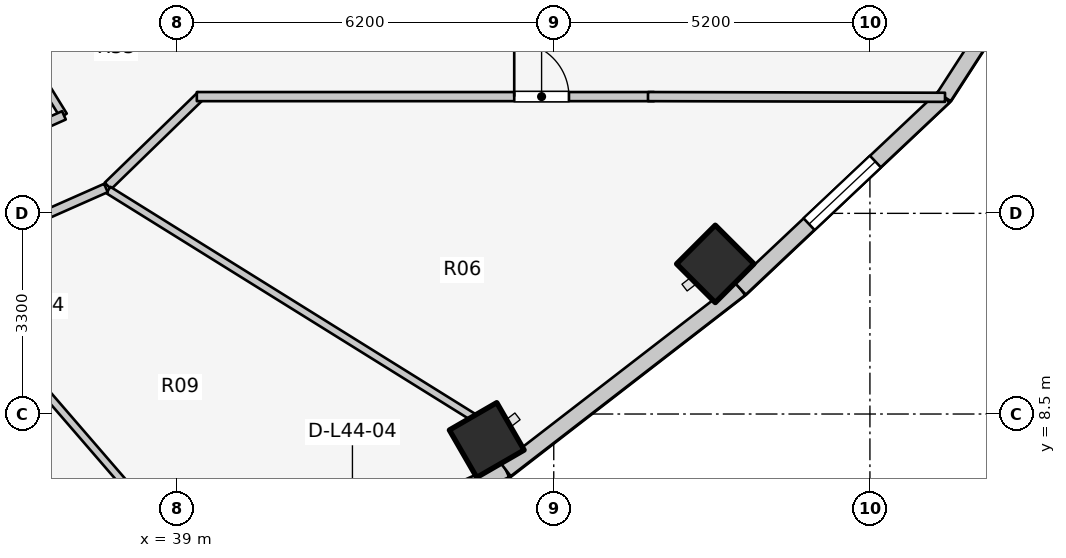
"""IFC4 building model, lengths in metres.
Left out: names, types, materials, properties, quantities, classifications, styles, units other than length and angle.
Written with IfcOpenShell. Run it as: python <this file> out.ifc"""

import sys

from ifc_helpers import new_model, si_unit, direction, frame, frame_2d, origin, origin_2d, place, context, subcontext, project, spatial, rectangle, extrude, element, fill, save


model = new_model("IFC4")
c1 = context("Model", 3, precision=1e-05, world=origin(), true_north=direction((0.0, 1.0)))
c2 = subcontext(c1, "Body", "Model", "MODEL_VIEW")
j1 = project(units=[si_unit("LENGTHUNIT", "METRE"), si_unit("PLANEANGLEUNIT", "RADIAN")], contexts=[c1])
p1 = place(None, origin())
s1 = spatial("IfcSite", under=j1, at=p1, CompositionType="ELEMENT")
p2 = place(p1, origin())
s2 = spatial("IfcBuilding", under=s1, at=p2, CompositionType="ELEMENT")
p3 = place(p2, frame((0.0, 0.0, 146.7)))
s3 = spatial("IfcBuildingStorey", under=s2, at=p3, CompositionType="ELEMENT", Elevation=146.7)
for number, where, z_axis, x_axis in (
    (1, (44.098, 8.072, 0.0), (0.0, 0.0, 1.0), (0.5, -0.866, 0.0)),
    (2, (47.857, 10.969, 0.0), (0.0, 0.0, 1.0), (0.707, -0.707, 0.0)),
):
    element("IfcColumn", number, at=place(p3, frame(where, z_axis=z_axis, x_axis=x_axis)), inside=s3, PredefinedType="COLUMN", context=c2, shape_type="SweptSolid", body=[
        extrude(rectangle(XDim=0.9, YDim=0.9, at=origin_2d()), origin(), (0.0, 0.0, 1.0), 3.1),
    ])
p4 = place(p3, frame((39.365, 5.315, 0.0), z_axis=(0.0, 0.0, 1.0), x_axis=(0.912353637112, 0.409403029847, 0.0)))
e3 = element("IfcWall", 3, at=p4, inside=s3, PredefinedType="STANDARD", context=c2, shape_type="SweptSolid", body=[
    extrude(rectangle(XDim=5.533, YDim=0.26, at=frame_2d((2.766, 0.0))), origin(), (0.0, 0.0, 1.0), 2.88),
])
p5 = place(p4, frame((2.167, 0.0, 0.0)))
e4 = element("IfcOpeningElement", 4, at=p5, cuts=e3, PredefinedType="OPENING", context=c2, shape_type="SweptSolid", body=[
    extrude(rectangle(XDim=1.2, YDim=2.2, at=frame_2d((0.6, 1.1))), frame((0.0, 0.14, 0.0), z_axis=(0.0, -1.0, 0.0), x_axis=(1.0, 0.0, 0.0)), (0.0, 0.0, 1.0), 0.28),
])
p6 = place(p3, frame((44.413, 7.581, 0.0), z_axis=(0.0, 0.0, 1.0), x_axis=(0.791460185804, 0.611220724687, 0.0)))
e5 = element("IfcWall", 5, at=p6, inside=s3, PredefinedType="STANDARD", context=c2, shape_type="SweptSolid", body=[
    extrude(rectangle(XDim=4.872, YDim=0.26, at=frame_2d((2.436, 0.0))), origin(), (0.0, 0.0, 1.0), 2.85),
])
p7 = place(p3, frame((48.269, 10.559, 0.0), z_axis=(0.0, 0.0, 1.0), x_axis=(0.727667301037, 0.68593024354, 0.0)))
e6 = element("IfcWall", 6, at=p7, inside=s3, PredefinedType="STANDARD", context=c2, shape_type="SweptSolid", body=[
    extrude(rectangle(XDim=4.604, YDim=0.26, at=frame_2d((2.302, 0.0))), origin(), (0.0, 0.0, 1.0), 2.85),
])
p8 = place(p7, frame((1.552, 0.0, 0.75)))
e7 = element("IfcOpeningElement", 7, at=p8, cuts=e6, PredefinedType="OPENING", context=c2, shape_type="SweptSolid", body=[
    extrude(rectangle(XDim=1.5, YDim=1.6, at=frame_2d((0.75, 0.8))), frame((0.0, 0.14, 0.0), z_axis=(0.0, -1.0, 0.0), x_axis=(1.0, 0.0, 0.0)), (0.0, 0.0, 1.0), 0.28),
])
p9 = place(p3, frame((51.619, 13.716, 0.0), z_axis=(0.0, 0.0, 1.0), x_axis=(0.543358984534, 0.839500454989, 0.0)))
e8 = element("IfcWall", 8, at=p9, inside=s3, PredefinedType="STANDARD", context=c2, shape_type="SweptSolid", body=[
    extrude(rectangle(XDim=4.511, YDim=0.26, at=frame_2d((2.256, 0.0))), origin(), (0.0, 0.0, 1.0), 2.85),
])
p10 = place(p9, frame((1.056, 0.0, 0.75)))
e9 = element("IfcOpeningElement", 9, at=p10, cuts=e8, PredefinedType="OPENING", context=c2, shape_type="SweptSolid", body=[
    extrude(rectangle(XDim=2.4, YDim=1.7, at=frame_2d((1.2, 0.85))), frame((0.0, 0.14, 0.0), z_axis=(0.0, -1.0, 0.0), x_axis=(1.0, 0.0, 0.0)), (0.0, 0.0, 1.0), 0.28),
])
p11 = place(p3, frame((37.867, 12.251, 0.0), z_axis=(0.0, 0.0, 1.0), x_axis=(0.717419568599, 0.696641344302, 0.0)))
e10 = element("IfcWall", 10, at=p11, inside=s3, PredefinedType="PARTITIONING", context=c2, shape_type="SweptSolid", body=[
    extrude(rectangle(XDim=2.138, YDim=0.15, at=frame_2d((1.069, 0.0))), origin(), (0.0, 0.0, 1.0), 2.299),
])
p12 = place(p3, frame((39.33, 13.72, 0.0), z_axis=(0.0, 0.0, 1.0), x_axis=(1.0, 0.0, 0.0)))
e11 = element("IfcWall", 11, at=p12, inside=s3, PredefinedType="PARTITIONING", context=c2, shape_type="SweptSolid", body=[
    extrude(rectangle(XDim=7.52, YDim=0.15, at=frame_2d((3.76, 0.0))), origin(), (0.0, 0.0, 1.0), 2.299),
])
p13 = place(p12, frame((5.22, 0.0, 0.0)))
e12 = element("IfcOpeningElement", 12, at=p13, cuts=e11, PredefinedType="OPENING", context=c2, shape_type="SweptSolid", body=[
    extrude(rectangle(XDim=0.9, YDim=2.1, at=frame_2d((0.45, 1.05))), frame((0.0, 0.085, 0.0), z_axis=(0.0, -1.0, 0.0), x_axis=(1.0, 0.0, 0.0)), (0.0, 0.0, 1.0), 0.17),
])
p14 = place(p3, frame((46.75, 13.72, 0.0), z_axis=(0.0, 0.0, 1.0), x_axis=(0.999997122315, -0.00239903348, 0.0)))
e13 = element("IfcWall", 13, at=p14, inside=s3, PredefinedType="PARTITIONING", context=c2, shape_type="SweptSolid", body=[
    extrude(rectangle(XDim=4.885, YDim=0.15, at=frame_2d((2.442, 0.0))), origin(), (0.0, 0.0, 1.0), 2.22),
])
p15 = place(p3, frame((35.55, 15.985, 0.0), z_axis=(0.0, 0.0, 1.0), x_axis=(0.524565340045, -0.851370192116, 0.0)))
e14 = element("IfcWall", 14, at=p15, inside=s3, PredefinedType="PARTITIONING", context=c2, shape_type="SweptSolid", body=[
    extrude(rectangle(XDim=3.027, YDim=0.125, at=frame_2d((1.514, 0.0))), origin(), (0.0, 0.0, 1.0), 2.299),
])
p16 = place(p3, frame((34.653, 12.299, 0.0), z_axis=(0.0, 0.0, 1.0), x_axis=(0.913112902883, 0.407706789971, 0.0)))
e15 = element("IfcWall", 15, at=p16, inside=s3, PredefinedType="PARTITIONING", context=c2, shape_type="SweptSolid", body=[
    extrude(rectangle(XDim=2.729, YDim=0.15, at=frame_2d((1.364, 0.0))), origin(), (0.0, 0.0, 1.0), 2.299),
])
p17 = place(p16, frame((0.889, 0.0, 0.0)))
e16 = element("IfcOpeningElement", 16, at=p17, cuts=e15, PredefinedType="OPENING", context=c2, shape_type="SweptSolid", body=[
    extrude(rectangle(XDim=0.95, YDim=2.1, at=frame_2d((0.475, 1.05))), frame((0.0, 0.085, 0.0), z_axis=(0.0, -1.0, 0.0), x_axis=(1.0, 0.0, 0.0)), (0.0, 0.0, 1.0), 0.17),
])
p18 = place(p3, frame((35.053, 10.927, 0.0), z_axis=(0.0, 0.0, 1.0), x_axis=(0.653779283332, -0.756685303601, 0.0)))
e17 = element("IfcWall", 17, at=p18, inside=s3, PredefinedType="PARTITIONING", context=c2, shape_type="SweptSolid", body=[
    extrude(rectangle(XDim=6.14, YDim=0.125, at=frame_2d((3.07, 0.0))), origin(), (0.0, 0.0, 1.0), 2.299),
])
p19 = place(p3, frame((37.875, 12.184, 0.0), z_axis=(0.0, 0.0, 1.0), x_axis=(0.849008457073, -0.528379257559, 0.0)))
e18 = element("IfcWall", 18, at=p19, inside=s3, PredefinedType="PARTITIONING", context=c2, shape_type="SweptSolid", body=[
    extrude(rectangle(XDim=7.077, YDim=0.125, at=frame_2d((3.539, 0.0))), origin(), (0.0, 0.0, 1.0), 2.299),
])
p20 = place(p3, frame((35.009, 10.966, 0.0), z_axis=(0.0, 0.0, 1.0), x_axis=(0.91445214467, 0.404694051239, 0.0)))
e19 = element("IfcWall", 19, at=p20, inside=s3, PredefinedType="PARTITIONING", context=c2, shape_type="SweptSolid", body=[
    extrude(rectangle(XDim=3.091, YDim=0.15, at=frame_2d((1.545, 0.0))), origin(), (0.0, 0.0, 1.0), 2.299),
])
p21 = place(p20, frame((1.045, 0.0, 0.0)))
e20 = element("IfcOpeningElement", 20, at=p21, cuts=e19, PredefinedType="OPENING", context=c2, shape_type="SweptSolid", body=[
    extrude(rectangle(XDim=1.0, YDim=2.1, at=frame_2d((0.5, 1.05))), frame((0.0, 0.085, 0.0), z_axis=(0.0, -1.0, 0.0), x_axis=(1.0, 0.0, 0.0)), (0.0, 0.0, 1.0), 0.17),
])
p22 = place(p8, origin())
e21 = element("IfcWindow", 21, at=p22, inside=s3, PartitioningType="SINGLE_PANEL", PredefinedType="WINDOW", context=c2, shape_type="SweptSolid", body=[
    extrude(rectangle(XDim=1.5, YDim=1.6, at=frame_2d((0.75, 0.8))), frame((0.0, 0.03, 0.0), z_axis=(0.0, -1.0, 0.0), x_axis=(1.0, 0.0, 0.0)), (0.0, 0.0, 1.0), 0.06),
])
fill(e7, e21)
p23 = place(p13, origin())
e22 = element("IfcDoor", 22, at=p23, inside=s3, OperationType="SINGLE_SWING_LEFT", PredefinedType="DOOR", context=c2, shape_type="SweptSolid", body=[
    extrude(rectangle(XDim=0.9, YDim=2.1, at=frame_2d((0.45, 1.05))), frame((0.0, 0.025, 0.0), z_axis=(0.0, -1.0, 0.0), x_axis=(1.0, 0.0, 0.0)), (0.0, 0.0, 1.0), 0.05),
])
fill(e12, e22)
save(model, sys.argv[1])
